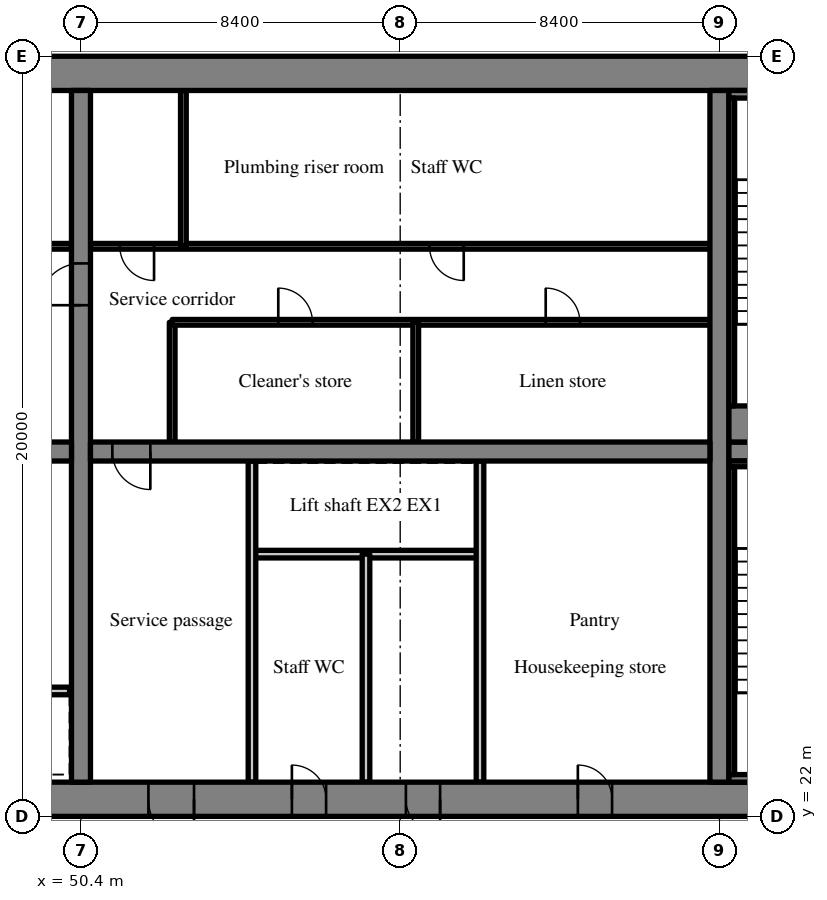
"""IFC4 building model, lengths in metres.
Left out: names, types, materials, properties, quantities, classifications, styles, units other than length and angle.
Written with IfcOpenShell. Run it as: python <this file> out.ifc"""

import sys

from ifc_helpers import new_model, si_unit, direction, frame, frame_2d, origin, place, context, subcontext, project, spatial, rectangle, extrude, source, transform, mapped, element, fill, save


model = new_model("IFC4")
c1 = context("Model", 3, precision=1e-05, world=origin(), true_north=direction((0.0, 1.0)))
c2 = subcontext(c1, "Body", "Model", "MODEL_VIEW")
j1 = project(units=[si_unit("LENGTHUNIT", "METRE"), si_unit("PLANEANGLEUNIT", "RADIAN")], contexts=[c1])
p1 = place(None, origin())
s1 = spatial("IfcSite", under=j1, at=p1, CompositionType="ELEMENT")
p2 = place(p1, origin())
s2 = spatial("IfcBuilding", under=s1, at=p2, CompositionType="ELEMENT")
p3 = place(p2, frame((0.0, 0.0, 129.4)))
s3 = spatial("IfcBuildingStorey", under=s2, at=p3, CompositionType="ELEMENT", Elevation=129.4)
m1 = source(origin(), c2, "Body", "SweptSolid", [
    extrude(rectangle(XDim=50.4, YDim=0.9, at=frame_2d((25.2, 0.0))), origin(), (0.0, 0.0, 1.0), 3.52),
])
p4 = place(p3, frame((25.2, 22.45, 0.0), z_axis=(0.0, 0.0, 1.0), x_axis=(1.0, 0.0, 0.0)))
e1 = element("IfcWall", 1, at=p4, inside=s3, PredefinedType="SHEAR", context=c2, shape_type="MappedRepresentation", body=[
    mapped(m1, transform((0.0, 0.0, 0.0), scale=1.0)),
])
m2 = source(origin(), c2, "Body", "SweptSolid", [
    extrude(rectangle(XDim=1.8, YDim=2.1, at=frame_2d((0.9, 1.05))), frame((0.0, 0.46, 0.0), z_axis=(0.0, -1.0, 0.0), x_axis=(1.0, 0.0, 0.0)), (0.0, 0.0, 1.0), 0.92),
])
p5 = place(p4, frame((15.9, 0.0, 0.0)))
e2 = element("IfcOpeningElement", 2, at=p5, cuts=e1, PredefinedType="OPENING", context=c2, shape_type="MappedRepresentation", body=[
    mapped(m2, transform((0.0, 0.0, 0.0), scale=1.0)),
])
m3 = source(origin(), c2, "Body", "SweptSolid", [
    extrude(rectangle(XDim=1.2, YDim=2.1, at=frame_2d((0.6, 1.05))), frame((0.0, 0.46, 0.0), z_axis=(0.0, -1.0, 0.0), x_axis=(1.0, 0.0, 0.0)), (0.0, 0.0, 1.0), 0.92),
])
p6 = place(p4, frame((26.975, 0.0, 0.0)))
e3 = element("IfcOpeningElement", 3, at=p6, cuts=e1, PredefinedType="OPENING", context=c2, shape_type="MappedRepresentation", body=[
    mapped(m3, transform((0.0, 0.0, 0.0), scale=1.0)),
])
m4 = source(origin(), c2, "Body", "SweptSolid", [
    extrude(rectangle(XDim=0.9, YDim=2.1, at=frame_2d((0.45, 1.05))), frame((0.0, 0.46, 0.0), z_axis=(0.0, -1.0, 0.0), x_axis=(1.0, 0.0, 0.0)), (0.0, 0.0, 1.0), 0.92),
])
p7 = place(p4, frame((33.75, 0.0, 0.0)))
e4 = element("IfcOpeningElement", 4, at=p7, cuts=e1, PredefinedType="OPENING", context=c2, shape_type="MappedRepresentation", body=[
    mapped(m4, transform((0.0, 0.0, 0.0), scale=1.0)),
])
p8 = place(p4, frame((30.75, 0.0, 0.0)))
e5 = element("IfcOpeningElement", 5, at=p8, cuts=e1, PredefinedType="OPENING", context=c2, shape_type="MappedRepresentation", body=[
    mapped(m4, transform((0.0, 0.0, 0.0), scale=1.0)),
])
p9 = place(p4, frame((38.275, 0.0, 0.0)))
e6 = element("IfcOpeningElement", 6, at=p9, cuts=e1, PredefinedType="OPENING", context=c2, shape_type="MappedRepresentation", body=[
    mapped(m4, transform((0.0, 0.0, 0.0), scale=1.0)),
])
p10 = place(p4, frame((6.45, 0.0, 0.0)))
e7 = element("IfcOpeningElement", 7, at=p10, cuts=e1, PredefinedType="OPENING", context=c2, shape_type="MappedRepresentation", body=[
    mapped(m3, transform((0.0, 0.0, 0.0), scale=1.0)),
])
p11 = place(p4, frame((47.775, 0.0, 0.0)))
e8 = element("IfcOpeningElement", 8, at=p11, cuts=e1, PredefinedType="OPENING", context=c2, shape_type="MappedRepresentation", body=[
    mapped(m3, transform((0.0, 0.0, 0.0), scale=1.0)),
])
p12 = place(p3, frame((25.2, 41.55, 0.0), z_axis=(0.0, 0.0, 1.0), x_axis=(1.0, 0.0, 0.0)))
e9 = element("IfcWall", 9, at=p12, inside=s3, PredefinedType="SHEAR", context=c2, shape_type="MappedRepresentation", body=[
    mapped(m1, transform((0.0, 0.0, 0.0), scale=1.0)),
])
m5 = source(origin(), c2, "Body", "SweptSolid", [
    extrude(rectangle(XDim=18.2, YDim=0.5, at=frame_2d((9.1, 0.0))), origin(), (0.0, 0.0, 1.0), 3.52),
])
p13 = place(p3, frame((50.4, 22.9, 0.0), z_axis=(0.0, 0.0, 1.0), x_axis=(0.0, 1.0, 0.0)))
e10 = element("IfcWall", 10, at=p13, inside=s3, PredefinedType="SHEAR", context=c2, shape_type="MappedRepresentation", body=[
    mapped(m5, transform((0.0, 0.0, 0.0), scale=1.0)),
])
m6 = source(origin(), c2, "Body", "SweptSolid", [
    extrude(rectangle(XDim=1.1, YDim=2.1, at=frame_2d((0.55, 1.05))), frame((0.0, 0.26, 0.0), z_axis=(0.0, -1.0, 0.0), x_axis=(1.0, 0.0, 0.0)), (0.0, 0.0, 1.0), 0.52),
])
p14 = place(p13, frame((12.55, 0.0, 0.0)))
e11 = element("IfcOpeningElement", 11, at=p14, cuts=e10, PredefinedType="OPENING", context=c2, shape_type="MappedRepresentation", body=[
    mapped(m6, transform((0.0, 0.0, 0.0), scale=1.0)),
])
p15 = place(p3, frame((67.2, 22.9, 0.0), z_axis=(0.0, 0.0, 1.0), x_axis=(0.0, 1.0, 0.0)))
e12 = element("IfcWall", 12, at=p15, inside=s3, PredefinedType="SHEAR", context=c2, shape_type="MappedRepresentation", body=[
    mapped(m5, transform((0.0, 0.0, 0.0), scale=1.0)),
])
m7 = source(origin(), c2, "Body", "SweptSolid", [
    extrude(rectangle(XDim=16.3, YDim=0.5, at=frame_2d((8.15, 0.0))), origin(), (0.0, 0.0, 1.0), 3.52),
])
p16 = place(p3, frame((33.85, 31.6, 0.0), z_axis=(0.0, 0.0, 1.0), x_axis=(1.0, 0.0, 0.0)))
e13 = element("IfcWall", 13, at=p16, inside=s3, PredefinedType="SHEAR", context=c2, shape_type="MappedRepresentation", body=[
    mapped(m7, transform((0.0, 0.0, 0.0), scale=1.0)),
])
m8 = source(origin(), c2, "Body", "SweptSolid", [
    extrude(rectangle(XDim=1.0, YDim=2.1, at=frame_2d((0.5, 1.05))), frame((0.0, 0.26, 0.0), z_axis=(0.0, -1.0, 0.0), x_axis=(1.0, 0.0, 0.0)), (0.0, 0.0, 1.0), 0.52),
])
p17 = place(p16, frame((14.725, 0.0, 0.0)))
e14 = element("IfcOpeningElement", 14, at=p17, cuts=e13, PredefinedType="OPENING", context=c2, shape_type="MappedRepresentation", body=[
    mapped(m8, transform((0.0, 0.0, 0.0), scale=1.0)),
])
m9 = source(origin(), c2, "Body", "SweptSolid", [
    extrude(rectangle(XDim=16.3, YDim=0.5, at=frame_2d((8.15, 0.0))), origin(), (0.0, 0.0, 1.0), 3.52),
])
p18 = place(p3, frame((50.65, 31.6, 0.0), z_axis=(0.0, 0.0, 1.0), x_axis=(1.0, 0.0, 0.0)))
e15 = element("IfcWall", 15, at=p18, inside=s3, PredefinedType="SHEAR", context=c2, shape_type="MappedRepresentation", body=[
    mapped(m9, transform((0.0, 0.0, 0.0), scale=1.0)),
])
p19 = place(p18, frame((0.575, 0.0, 0.0)))
e16 = element("IfcOpeningElement", 16, at=p19, cuts=e15, PredefinedType="OPENING", context=c2, shape_type="MappedRepresentation", body=[
    mapped(m8, transform((0.0, 0.0, 0.0), scale=1.0)),
])
m10 = source(origin(), c2, "Body", "SweptSolid", [
    extrude(rectangle(XDim=7.25, YDim=0.5, at=frame_2d((3.625, 0.0))), origin(), (0.0, 0.0, 1.0), 3.52),
])
p20 = place(p3, frame((67.45, 31.6, 0.0), z_axis=(0.0, 0.0, 1.0), x_axis=(1.0, 0.0, 0.0)))
e17 = element("IfcWall", 17, at=p20, inside=s3, PredefinedType="SHEAR", context=c2, shape_type="MappedRepresentation", body=[
    mapped(m10, transform((0.0, 0.0, 0.0), scale=1.0)),
])
p21 = place(p20, frame((5.575, 0.0, 0.0)))
e18 = element("IfcOpeningElement", 18, at=p21, cuts=e17, PredefinedType="OPENING", context=c2, shape_type="MappedRepresentation", body=[
    mapped(m6, transform((0.0, 0.0, 0.0), scale=1.0)),
])
m11 = source(origin(), c2, "Body", "SweptSolid", [
    extrude(rectangle(XDim=6.0, YDim=0.2, at=frame_2d((3.0, 0.0))), origin(), (0.0, 0.0, 1.0), 3.52),
])
p22 = place(p3, frame((44.1, 25.3, 0.0), z_axis=(0.0, 0.0, 1.0), x_axis=(1.0, 0.0, 0.0)))
e19 = element("IfcWall", 19, at=p22, inside=s3, PredefinedType="SOLIDWALL", context=c2, shape_type="MappedRepresentation", body=[
    mapped(m11, transform((0.0, 0.0, 0.0), scale=1.0)),
])
m12 = source(origin(), c2, "Body", "SweptSolid", [
    extrude(rectangle(XDim=1.1, YDim=2.1, at=frame_2d((0.55, 1.05))), frame((0.0, 0.11, 0.0), z_axis=(0.0, -1.0, 0.0), x_axis=(1.0, 0.0, 0.0)), (0.0, 0.0, 1.0), 0.22),
])
p23 = place(p22, frame((0.95, 0.0, 0.0)))
e20 = element("IfcOpeningElement", 20, at=p23, cuts=e19, PredefinedType="OPENING", context=c2, shape_type="MappedRepresentation", body=[
    mapped(m12, transform((0.0, 0.0, 0.0), scale=1.0)),
])
p24 = place(p22, frame((3.95, 0.0, 0.0)))
e21 = element("IfcOpeningElement", 21, at=p24, cuts=e19, PredefinedType="OPENING", context=c2, shape_type="MappedRepresentation", body=[
    mapped(m12, transform((0.0, 0.0, 0.0), scale=1.0)),
])
m13 = source(origin(), c2, "Body", "SweptSolid", [
    extrude(rectangle(XDim=16.3, YDim=0.15, at=frame_2d((8.15, 0.0))), origin(), (0.0, 0.0, 1.0), 3.52),
])
p25 = place(p3, frame((33.85, 37.0, 0.0), z_axis=(0.0, 0.0, 1.0), x_axis=(1.0, 0.0, 0.0)))
e22 = element("IfcWall", 22, at=p25, inside=s3, PredefinedType="PARTITIONING", context=c2, shape_type="MappedRepresentation", body=[
    mapped(m13, transform((0.0, 0.0, 0.0), scale=1.0)),
])
m14 = source(origin(), c2, "Body", "SweptSolid", [
    extrude(rectangle(XDim=0.9, YDim=2.1, at=frame_2d((0.45, 1.05))), frame((0.0, 0.085, 0.0), z_axis=(0.0, -1.0, 0.0), x_axis=(1.0, 0.0, 0.0)), (0.0, 0.0, 1.0), 0.17),
])
p26 = place(p25, frame((0.773, 0.0, 0.0)))
e23 = element("IfcOpeningElement", 23, at=p26, cuts=e22, PredefinedType="OPENING", context=c2, shape_type="MappedRepresentation", body=[
    mapped(m14, transform((0.0, 0.0, 0.0), scale=1.0)),
])
p27 = place(p25, frame((3.625, 0.0, 0.0)))
e24 = element("IfcOpeningElement", 24, at=p27, cuts=e22, PredefinedType="OPENING", context=c2, shape_type="MappedRepresentation", body=[
    mapped(m14, transform((0.0, 0.0, 0.0), scale=1.0)),
])
p28 = place(p25, frame((9.33, 0.0, 0.0)))
e25 = element("IfcOpeningElement", 25, at=p28, cuts=e22, PredefinedType="OPENING", context=c2, shape_type="MappedRepresentation", body=[
    mapped(m14, transform((0.0, 0.0, 0.0), scale=1.0)),
])
p29 = place(p25, frame((14.627, 0.0, 0.0)))
e26 = element("IfcOpeningElement", 26, at=p29, cuts=e22, PredefinedType="OPENING", context=c2, shape_type="MappedRepresentation", body=[
    mapped(m14, transform((0.0, 0.0, 0.0), scale=1.0)),
])
p30 = place(p3, frame((60.9, 28.9, 0.0), z_axis=(0.0, 0.0, 1.0), x_axis=(-1.0, 0.0, 0.0)))
e27 = element("IfcWall", 27, at=p30, inside=s3, PredefinedType="SOLIDWALL", context=c2, shape_type="MappedRepresentation", body=[
    mapped(m11, transform((0.0, 0.0, 0.0), scale=1.0)),
])
m15 = source(origin(), c2, "Body", "SweptSolid", [
    extrude(rectangle(XDim=8.45, YDim=0.2, at=frame_2d((4.225, 0.0))), origin(), (0.0, 0.0, 1.0), 3.52),
])
for number, where, z_axis, x_axis in (
    (28, (54.9, 22.9, 0.0), (0.0, 0.0, 1.0), (0.0, 1.0, 0.0)),
    (29, (60.9, 22.9, 0.0), (0.0, 0.0, 1.0), (0.0, 1.0, 0.0)),
):
    element("IfcWall", number, at=place(p3, frame(where, z_axis=z_axis, x_axis=x_axis)), inside=s3, PredefinedType="PARTITIONING", context=c2, shape_type="MappedRepresentation", body=[
        mapped(m15, transform((0.0, 0.0, 0.0), scale=1.0)),
    ])
p31 = place(p3, frame((57.9, 22.9, 0.0), z_axis=(0.0, 0.0, 1.0), x_axis=(0.0, 1.0, 0.0)))
e30 = element("IfcWall", 30, at=p31, inside=s3, PredefinedType="PARTITIONING", context=c2, shape_type="MappedRepresentation", body=[
    mapped(m11, transform((0.0, 0.0, 0.0), scale=1.0)),
])
m16 = source(origin(), c2, "Body", "SweptSolid", [
    extrude(rectangle(XDim=3.15, YDim=0.15, at=frame_2d((1.575, 0.0))), origin(), (0.0, 0.0, 1.0), 3.52),
])
p32 = place(p3, frame((52.8, 31.85, 0.0), z_axis=(0.0, 0.0, 1.0), x_axis=(0.0, 1.0, 0.0)))
e31 = element("IfcWall", 31, at=p32, inside=s3, PredefinedType="PARTITIONING", context=c2, shape_type="MappedRepresentation", body=[
    mapped(m16, transform((0.0, 0.0, 0.0), scale=1.0)),
])
m17 = source(origin(), c2, "Body", "SweptSolid", [
    extrude(rectangle(XDim=14.15, YDim=0.15, at=frame_2d((7.075, 0.0))), origin(), (0.0, 0.0, 1.0), 3.52),
])
p33 = place(p3, frame((66.95, 35.0, 0.0), z_axis=(0.0, 0.0, 1.0), x_axis=(-1.0, 0.0, 0.0)))
e32 = element("IfcWall", 32, at=p33, inside=s3, PredefinedType="PARTITIONING", context=c2, shape_type="MappedRepresentation", body=[
    mapped(m17, transform((0.0, 0.0, 0.0), scale=1.0)),
])
p34 = place(p33, frame((3.421, 0.0, 0.0)))
e33 = element("IfcOpeningElement", 33, at=p34, cuts=e32, PredefinedType="OPENING", context=c2, shape_type="MappedRepresentation", body=[
    mapped(m14, transform((0.0, 0.0, 0.0), scale=1.0)),
])
p35 = place(p33, frame((10.458, 0.0, 0.0)))
e34 = element("IfcOpeningElement", 34, at=p35, cuts=e32, PredefinedType="OPENING", context=c2, shape_type="MappedRepresentation", body=[
    mapped(m14, transform((0.0, 0.0, 0.0), scale=1.0)),
])
m18 = source(origin(), c2, "Body", "SweptSolid", [
    extrude(rectangle(XDim=16.3, YDim=0.15, at=frame_2d((8.15, 0.0))), origin(), (0.0, 0.0, 1.0), 3.52),
])
p36 = place(p3, frame((66.95, 37.0, 0.0), z_axis=(0.0, 0.0, 1.0), x_axis=(-1.0, 0.0, 0.0)))
e35 = element("IfcWall", 35, at=p36, inside=s3, PredefinedType="PARTITIONING", context=c2, shape_type="MappedRepresentation", body=[
    mapped(m18, transform((0.0, 0.0, 0.0), scale=1.0)),
])
p37 = place(p36, frame((6.478, 0.0, 0.0)))
e36 = element("IfcOpeningElement", 36, at=p37, cuts=e35, PredefinedType="OPENING", context=c2, shape_type="MappedRepresentation", body=[
    mapped(m14, transform((0.0, 0.0, 0.0), scale=1.0)),
])
p38 = place(p36, frame((14.627, 0.0, 0.0)))
e37 = element("IfcOpeningElement", 37, at=p38, cuts=e35, PredefinedType="OPENING", context=c2, shape_type="MappedRepresentation", body=[
    mapped(m14, transform((0.0, 0.0, 0.0), scale=1.0)),
])
p39 = place(p3, frame((59.209, 31.85, 0.0), z_axis=(0.0, 0.0, 1.0), x_axis=(0.0, 1.0, 0.0)))
e38 = element("IfcWall", 38, at=p39, inside=s3, PredefinedType="PARTITIONING", context=c2, shape_type="MappedRepresentation", body=[
    mapped(m16, transform((0.0, 0.0, 0.0), scale=1.0)),
])
m19 = source(origin(), c2, "Body", "SweptSolid", [
    extrude(rectangle(XDim=4.1, YDim=0.15, at=frame_2d((2.05, 0.0))), origin(), (0.0, 0.0, 1.0), 3.52),
])
p40 = place(p3, frame((53.095, 37.0, 0.0), z_axis=(0.0, 0.0, 1.0), x_axis=(0.0, 1.0, 0.0)))
e39 = element("IfcWall", 39, at=p40, inside=s3, PredefinedType="PARTITIONING", context=c2, shape_type="MappedRepresentation", body=[
    mapped(m19, transform((0.0, 0.0, 0.0), scale=1.0)),
])
m20 = source(origin(), c2, "Body", "SweptSolid", [
    extrude(rectangle(XDim=4.8, YDim=0.2, at=frame_2d((2.4, 0.0))), origin(), (0.0, 0.0, 1.0), 3.52),
])
p41 = place(p3, frame((67.45, 23.0, 0.0), z_axis=(0.0, 0.0, 1.0), x_axis=(1.0, 0.0, 0.0)))
e40 = element("IfcWall", 40, at=p41, inside=s3, PredefinedType="SOLIDWALL", context=c2, shape_type="MappedRepresentation", body=[
    mapped(m20, transform((0.0, 0.0, 0.0), scale=1.0)),
])
m21 = source(origin(), c2, "Body", "SweptSolid", [
    extrude(rectangle(XDim=4.8, YDim=0.15, at=frame_2d((2.4, 0.0))), origin(), (0.0, 0.0, 1.0), 3.52),
])
p42 = place(p3, frame((67.45, 31.275, 0.0), z_axis=(0.0, 0.0, 1.0), x_axis=(1.0, 0.0, 0.0)))
e41 = element("IfcWall", 41, at=p42, inside=s3, PredefinedType="SOLIDWALL", context=c2, shape_type="MappedRepresentation", body=[
    mapped(m21, transform((0.0, 0.0, 0.0), scale=1.0)),
])
m22 = source(origin(), c2, "Body", "SweptSolid", [
    extrude(rectangle(XDim=8.1, YDim=0.15, at=frame_2d((4.05, 0.0))), origin(), (0.0, 0.0, 1.0), 3.52),
])
p43 = place(p3, frame((67.525, 23.1, 0.0), z_axis=(0.0, 0.0, 1.0), x_axis=(0.0, 1.0, 0.0)))
e42 = element("IfcWall", 42, at=p43, inside=s3, PredefinedType="SOLIDWALL", context=c2, shape_type="MappedRepresentation", body=[
    mapped(m22, transform((0.0, 0.0, 0.0), scale=1.0)),
])
p44 = place(p3, frame((67.45, 41.0, 0.0), z_axis=(0.0, 0.0, 1.0), x_axis=(1.0, 0.0, 0.0)))
e43 = element("IfcWall", 43, at=p44, inside=s3, PredefinedType="SOLIDWALL", context=c2, shape_type="MappedRepresentation", body=[
    mapped(m20, transform((0.0, 0.0, 0.0), scale=1.0)),
])
m23 = source(origin(), c2, "Body", "SweptSolid", [
    extrude(rectangle(XDim=4.8, YDim=0.95, at=frame_2d((2.4, 0.0))), origin(), (0.0, 0.0, 1.0), 3.52),
])
p45 = place(p3, frame((67.45, 32.325, 0.0), z_axis=(0.0, 0.0, 1.0), x_axis=(1.0, 0.0, 0.0)))
e44 = element("IfcWall", 44, at=p45, inside=s3, PredefinedType="SOLIDWALL", context=c2, shape_type="MappedRepresentation", body=[
    mapped(m23, transform((0.0, 0.0, 0.0), scale=1.0)),
])
p46 = place(p3, frame((67.525, 32.8, 0.0), z_axis=(0.0, 0.0, 1.0), x_axis=(0.0, 1.0, 0.0)))
e45 = element("IfcWall", 45, at=p46, inside=s3, PredefinedType="SOLIDWALL", context=c2, shape_type="MappedRepresentation", body=[
    mapped(m22, transform((0.0, 0.0, 0.0), scale=1.0)),
])
m24 = source(origin(), c2, "Body", "SweptSolid", [
    extrude(rectangle(XDim=1.2, YDim=2.1, at=frame_2d((0.6, 1.05))), frame((0.0, 0.375, 0.0), z_axis=(0.0, -1.0, 0.0), x_axis=(1.0, 0.0, 0.0)), (0.0, 0.0, 1.0), 0.05),
])
p47 = place(p6, origin())
e46 = element("IfcDoor", 46, at=p47, inside=s3, OperationType="SINGLE_SWING_RIGHT", PredefinedType="DOOR", context=c2, shape_type="MappedRepresentation", body=[
    mapped(m24, transform((0.0, 0.0, 0.0), scale=1.0)),
])
fill(e3, e46)
m25 = source(origin(), c2, "Body", "SweptSolid", [
    extrude(rectangle(XDim=1.0, YDim=2.1, at=frame_2d((0.5, 1.05))), frame((0.0, 0.025, 0.0), z_axis=(0.0, -1.0, 0.0), x_axis=(1.0, 0.0, 0.0)), (0.0, 0.0, 1.0), 0.05),
])
p48 = place(p19, origin())
e47 = element("IfcDoor", 47, at=p48, inside=s3, OperationType="SINGLE_SWING_RIGHT", PredefinedType="DOOR", context=c2, shape_type="MappedRepresentation", body=[
    mapped(m25, transform((0.0, 0.0, 0.0), scale=1.0)),
])
fill(e16, e47)
m26 = source(origin(), c2, "Body", "SweptSolid", [
    extrude(rectangle(XDim=0.9, YDim=2.1, at=frame_2d((0.45, 1.05))), frame((0.0, 0.375, 0.0), z_axis=(0.0, -1.0, 0.0), x_axis=(1.0, 0.0, 0.0)), (0.0, 0.0, 1.0), 0.05),
])
p49 = place(p7, origin())
e48 = element("IfcDoor", 48, at=p49, inside=s3, OperationType="SINGLE_SWING_RIGHT", PredefinedType="DOOR", context=c2, shape_type="MappedRepresentation", body=[
    mapped(m26, transform((0.0, 0.0, 0.0), scale=1.0)),
])
fill(e4, e48)
p50 = place(p8, origin())
e49 = element("IfcDoor", 49, at=p50, inside=s3, OperationType="SINGLE_SWING_LEFT", PredefinedType="DOOR", context=c2, shape_type="MappedRepresentation", body=[
    mapped(m26, transform((0.0, 0.0, 0.0), scale=1.0)),
])
fill(e5, e49)
p51 = place(p9, origin())
e50 = element("IfcDoor", 50, at=p51, inside=s3, OperationType="SINGLE_SWING_LEFT", PredefinedType="DOOR", context=c2, shape_type="MappedRepresentation", body=[
    mapped(m26, transform((0.0, 0.0, 0.0), scale=1.0)),
])
fill(e6, e50)
m27 = source(origin(), c2, "Body", "SweptSolid", [
    extrude(rectangle(XDim=0.9, YDim=2.1, at=frame_2d((0.45, 1.05))), frame((0.0, 0.025, 0.0), z_axis=(0.0, -1.0, 0.0), x_axis=(1.0, 0.0, 0.0)), (0.0, 0.0, 1.0), 0.05),
])
p52 = place(p34, origin())
e51 = element("IfcDoor", 51, at=p52, inside=s3, OperationType="SINGLE_SWING_RIGHT", PredefinedType="DOOR", context=c2, shape_type="MappedRepresentation", body=[
    mapped(m27, transform((0.0, 0.0, 0.0), scale=1.0)),
])
fill(e33, e51)
p53 = place(p35, origin())
e52 = element("IfcDoor", 52, at=p53, inside=s3, OperationType="SINGLE_SWING_RIGHT", PredefinedType="DOOR", context=c2, shape_type="MappedRepresentation", body=[
    mapped(m27, transform((0.0, 0.0, 0.0), scale=1.0)),
])
fill(e34, e52)
p54 = place(p37, origin())
e53 = element("IfcDoor", 53, at=p54, inside=s3, OperationType="SINGLE_SWING_LEFT", PredefinedType="DOOR", context=c2, shape_type="MappedRepresentation", body=[
    mapped(m27, transform((0.0, 0.0, 0.0), scale=1.0)),
])
fill(e36, e53)
p55 = place(p38, origin())
e54 = element("IfcDoor", 54, at=p55, inside=s3, OperationType="SINGLE_SWING_LEFT", PredefinedType="DOOR", context=c2, shape_type="MappedRepresentation", body=[
    mapped(m27, transform((0.0, 0.0, 0.0), scale=1.0)),
])
fill(e37, e54)
m28 = source(origin(), c2, "Body", "SweptSolid", [
    extrude(rectangle(XDim=1.1, YDim=2.1, at=frame_2d((0.55, 1.05))), frame((0.0, 0.025, 0.0), z_axis=(0.0, -1.0, 0.0), x_axis=(1.0, 0.0, 0.0)), (0.0, 0.0, 1.0), 0.05),
])
p56 = place(p14, origin())
e55 = element("IfcDoor", 55, at=p56, inside=s3, OperationType="SINGLE_SWING_LEFT", PredefinedType="DOOR", context=c2, shape_type="MappedRepresentation", body=[
    mapped(m28, transform((0.0, 0.0, 0.0), scale=1.0)),
])
fill(e11, e55)
save(model, sys.argv[1])
